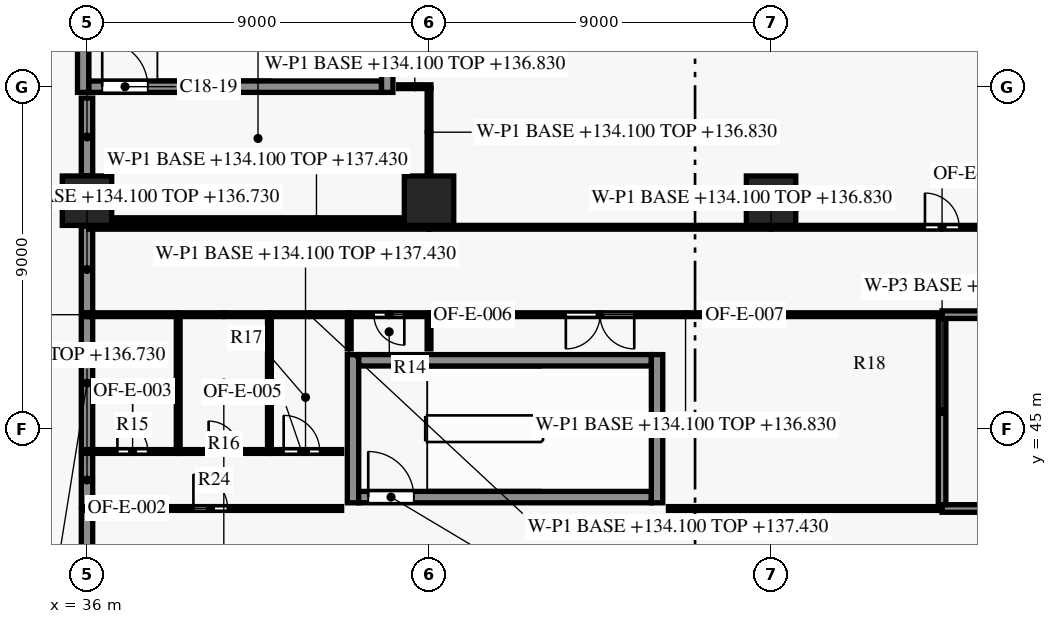
"""IFC4 building model, lengths in metres.
Left out: names, types, materials, properties, quantities, classifications, styles, units other than length and angle.
Written with IfcOpenShell. Run it as: python <this file> out.ifc"""

import sys

from ifc_helpers import new_model, si_unit, direction, frame, frame_2d, origin, origin_2d, place, context, subcontext, project, spatial, rectangle, extrude, element, fill, save


model = new_model("IFC4")
c1 = context("Model", 3, precision=1e-05, world=origin(), true_north=direction((0.0, 1.0)))
c2 = subcontext(c1, "Body", "Model", "MODEL_VIEW")
j1 = project(units=[si_unit("LENGTHUNIT", "METRE"), si_unit("PLANEANGLEUNIT", "RADIAN")], contexts=[c1])
p1 = place(None, origin())
s1 = spatial("IfcSite", under=j1, at=p1, CompositionType="ELEMENT")
p2 = place(p1, origin())
s2 = spatial("IfcBuilding", under=s1, at=p2, CompositionType="ELEMENT")
p3 = place(p2, frame((0.0, 0.0, 134.1)))
s3 = spatial("IfcBuildingStorey", under=s2, at=p3, CompositionType="ELEMENT", Elevation=134.1)
for number, where, z_axis, x_axis in (
    (1, (36.0, 51.0, 0.0), (0.0, 0.0, 1.0), (1.0, 0.0, 0.0)),
    (2, (45.0, 51.0, 0.0), (0.0, 0.0, 1.0), (1.0, 0.0, 0.0)),
    (3, (54.0, 51.0, 0.0), (0.0, 0.0, 1.0), (1.0, 0.0, 0.0)),
):
    element("IfcColumn", number, at=place(p3, frame(where, z_axis=z_axis, x_axis=x_axis)), inside=s3, PredefinedType="COLUMN", context=c2, shape_type="SweptSolid", body=[
        extrude(rectangle(XDim=1.3, YDim=1.3, at=origin_2d()), origin(), (0.0, 0.0, 1.0), 3.8),
    ])
p4 = place(p3, frame((43.15, 43.2, 0.0), z_axis=(0.0, 0.0, 1.0), x_axis=(1.0, 0.0, 0.0)))
e4 = element("IfcWall", 4, at=p4, inside=s3, PredefinedType="SHEAR", context=c2, shape_type="SweptSolid", body=[
    extrude(rectangle(XDim=7.7, YDim=0.3, at=frame_2d((3.85, 0.0))), origin(), (0.0, 0.0, 1.0), 3.5),
])
p5 = place(p4, frame((0.25, 0.0, 0.0)))
e5 = element("IfcOpeningElement", 5, at=p5, cuts=e4, PredefinedType="OPENING", context=c2, shape_type="SweptSolid", body=[
    extrude(rectangle(XDim=1.2, YDim=2.2, at=frame_2d((0.6, 1.1))), frame((0.0, 0.16, 0.0), z_axis=(0.0, -1.0, 0.0), x_axis=(1.0, 0.0, 0.0)), (0.0, 0.0, 1.0), 0.32),
])
p6 = place(p3, frame((43.15, 46.8, 0.0), z_axis=(0.0, 0.0, 1.0), x_axis=(1.0, 0.0, 0.0)))
e6 = element("IfcWall", 6, at=p6, inside=s3, PredefinedType="SHEAR", context=c2, shape_type="SweptSolid", body=[
    extrude(rectangle(XDim=7.7, YDim=0.3, at=frame_2d((3.85, 0.0))), origin(), (0.0, 0.0, 1.0), 3.5),
])
p7 = place(p3, frame((36.05, 54.0, 0.0), z_axis=(0.0, 0.0, 1.0), x_axis=(1.0, 0.0, 0.0)))
e7 = element("IfcWall", 7, at=p7, inside=s3, PredefinedType="SHEAR", context=c2, shape_type="SweptSolid", body=[
    extrude(rectangle(XDim=7.7, YDim=0.3, at=frame_2d((3.85, 0.0))), origin(), (0.0, 0.0, 1.0), 3.5),
])
p8 = place(p7, frame((0.35, 0.0, 0.0)))
e8 = element("IfcOpeningElement", 8, at=p8, cuts=e7, PredefinedType="OPENING", context=c2, shape_type="SweptSolid", body=[
    extrude(rectangle(XDim=1.2, YDim=2.2, at=frame_2d((0.6, 1.1))), frame((0.0, 0.16, 0.0), z_axis=(0.0, -1.0, 0.0), x_axis=(1.0, 0.0, 0.0)), (0.0, 0.0, 1.0), 0.32),
])
for number, where, z_axis, x_axis in (
    (9, (35.9, 53.85, 0.0), (0.0, 0.0, 1.0), (0.0, 1.0, 0.0)),
    (10, (43.0, 43.05, 0.0), (0.0, 0.0, 1.0), (0.0, 1.0, 0.0)),
    (11, (43.9, 53.85, 0.0), (0.0, 0.0, 1.0), (0.0, 1.0, 0.0)),
    (12, (51.0, 43.05, 0.0), (0.0, 0.0, 1.0), (0.0, 1.0, 0.0)),
):
    element("IfcWall", number, at=place(p3, frame(where, z_axis=z_axis, x_axis=x_axis)), inside=s3, PredefinedType="SHEAR", context=c2, shape_type="SweptSolid", body=[
        extrude(rectangle(XDim=3.9, YDim=0.3, at=frame_2d((1.95, 0.0))), origin(), (0.0, 0.0, 1.0), 3.5),
    ])
p9 = place(p3, frame((36.0, 39.67, 0.0), z_axis=(0.0, 0.0, 1.0), x_axis=(0.0, 1.0, 0.0)))
e13 = element("IfcWall", 13, at=p9, inside=s3, PredefinedType="PARTITIONING", context=c2, shape_type="SweptSolid", body=[
    extrude(rectangle(XDim=3.18, YDim=0.3, at=frame_2d((1.59, 0.0))), origin(), (0.0, 0.0, 1.0), 2.63),
])
p10 = place(p3, frame((36.05, 42.9, 0.0), z_axis=(0.0, 0.0, 1.0), x_axis=(1.0, 0.0, 0.0)))
e14 = element("IfcWall", 14, at=p10, inside=s3, PredefinedType="PARTITIONING", context=c2, shape_type="SweptSolid", body=[
    extrude(rectangle(XDim=6.65, YDim=0.1, at=frame_2d((3.325, 0.0))), origin(), (0.0, 0.0, 1.0), 2.63),
])
p11 = place(p10, frame((2.75, 0.0, 0.0)))
e15 = element("IfcOpeningElement", 15, at=p11, cuts=e14, PredefinedType="OPENING", context=c2, shape_type="SweptSolid", body=[
    extrude(rectangle(XDim=0.9, YDim=2.1, at=frame_2d((0.45, 1.05))), frame((0.0, 0.06, 0.0), z_axis=(0.0, -1.0, 0.0), x_axis=(1.0, 0.0, 0.0)), (0.0, 0.0, 1.0), 0.12),
])
p12 = place(p3, frame((51.3, 42.9, 0.0), z_axis=(0.0, 0.0, 1.0), x_axis=(1.0, 0.0, 0.0)))
e16 = element("IfcWall", 16, at=p12, inside=s3, PredefinedType="PARTITIONING", context=c2, shape_type="SweptSolid", body=[
    extrude(rectangle(XDim=7.2, YDim=0.1, at=frame_2d((3.6, 0.0))), origin(), (0.0, 0.0, 1.0), 2.63),
])
p13 = place(p3, frame((58.5, 42.9, 0.0), z_axis=(0.0, 0.0, 1.0), x_axis=(1.0, 0.0, 0.0)))
e17 = element("IfcWall", 17, at=p13, inside=s3, PredefinedType="PARTITIONING", context=c2, shape_type="SweptSolid", body=[
    extrude(rectangle(XDim=10.3, YDim=0.2, at=frame_2d((5.15, 0.0))), origin(), (0.0, 0.0, 1.0), 2.73),
])
p14 = place(p13, frame((4.6, 0.0, 0.0)))
e18 = element("IfcOpeningElement", 18, at=p14, cuts=e17, PredefinedType="OPENING", context=c2, shape_type="SweptSolid", body=[
    extrude(rectangle(XDim=1.0, YDim=2.1, at=frame_2d((0.5, 1.05))), frame((0.0, 0.11, 0.0), z_axis=(0.0, -1.0, 0.0), x_axis=(1.0, 0.0, 0.0)), (0.0, 0.0, 1.0), 0.22),
])
p15 = place(p3, frame((36.0, 42.95, 0.0), z_axis=(0.0, 0.0, 1.0), x_axis=(0.0, 1.0, 0.0)))
e19 = element("IfcWall", 19, at=p15, inside=s3, PredefinedType="PARTITIONING", context=c2, shape_type="SweptSolid", body=[
    extrude(rectangle(XDim=1.4, YDim=0.3, at=frame_2d((0.7, 0.0))), origin(), (0.0, 0.0, 1.0), 2.63),
])
p16 = place(p3, frame((36.05, 44.4, 0.0), z_axis=(0.0, 0.0, 1.0), x_axis=(1.0, 0.0, 0.0)))
e20 = element("IfcWall", 20, at=p16, inside=s3, PredefinedType="PARTITIONING", context=c2, shape_type="SweptSolid", body=[
    extrude(rectangle(XDim=2.35, YDim=0.1, at=frame_2d((1.175, 0.0))), origin(), (0.0, 0.0, 1.0), 2.63),
])
p17 = place(p16, frame((0.75, 0.0, 0.0)))
e21 = element("IfcOpeningElement", 21, at=p17, cuts=e20, PredefinedType="OPENING", context=c2, shape_type="SweptSolid", body=[
    extrude(rectangle(XDim=0.8, YDim=2.1, at=frame_2d((0.4, 1.05))), frame((0.0, 0.06, 0.0), z_axis=(0.0, -1.0, 0.0), x_axis=(1.0, 0.0, 0.0)), (0.0, 0.0, 1.0), 0.12),
])
p18 = place(p3, frame((38.4, 44.4, 0.0), z_axis=(0.0, 0.0, 1.0), x_axis=(1.0, 0.0, 0.0)))
e22 = element("IfcWall", 22, at=p18, inside=s3, PredefinedType="PARTITIONING", context=c2, shape_type="SweptSolid", body=[
    extrude(rectangle(XDim=2.4, YDim=0.1, at=frame_2d((1.2, 0.0))), origin(), (0.0, 0.0, 1.0), 3.33),
])
p19 = place(p18, frame((0.8, 0.0, 0.0)))
e23 = element("IfcOpeningElement", 23, at=p19, cuts=e22, PredefinedType="OPENING", context=c2, shape_type="SweptSolid", body=[
    extrude(rectangle(XDim=0.8, YDim=2.1, at=frame_2d((0.4, 1.05))), frame((0.0, 0.06, 0.0), z_axis=(0.0, -1.0, 0.0), x_axis=(1.0, 0.0, 0.0)), (0.0, 0.0, 1.0), 0.12),
])
p20 = place(p3, frame((40.8, 44.4, 0.0), z_axis=(0.0, 0.0, 1.0), x_axis=(1.0, 0.0, 0.0)))
e24 = element("IfcWall", 24, at=p20, inside=s3, PredefinedType="PARTITIONING", context=c2, shape_type="SweptSolid", body=[
    extrude(rectangle(XDim=1.9, YDim=0.1, at=frame_2d((0.95, 0.0))), origin(), (0.0, 0.0, 1.0), 3.33),
])
p21 = place(p20, frame((0.375, 0.0, 0.0)))
e25 = element("IfcOpeningElement", 25, at=p21, cuts=e24, PredefinedType="OPENING", context=c2, shape_type="SweptSolid", body=[
    extrude(rectangle(XDim=0.95, YDim=2.1, at=frame_2d((0.475, 1.05))), frame((0.0, 0.06, 0.0), z_axis=(0.0, -1.0, 0.0), x_axis=(1.0, 0.0, 0.0)), (0.0, 0.0, 1.0), 0.12),
])
p22 = place(p3, frame((36.0, 44.45, 0.0), z_axis=(0.0, 0.0, 1.0), x_axis=(0.0, 1.0, 0.0)))
e26 = element("IfcWall", 26, at=p22, inside=s3, PredefinedType="PARTITIONING", context=c2, shape_type="SweptSolid", body=[
    extrude(rectangle(XDim=3.5, YDim=0.3, at=frame_2d((1.75, 0.0))), origin(), (0.0, 0.0, 1.0), 2.63),
])
p23 = place(p3, frame((58.5, 47.9, 0.0), z_axis=(0.0, 0.0, 1.0), x_axis=(0.0, -1.0, 0.0)))
e27 = element("IfcWall", 27, at=p23, inside=s3, PredefinedType="PARTITIONING", context=c2, shape_type="SweptSolid", body=[
    extrude(rectangle(XDim=4.9, YDim=0.2, at=frame_2d((2.45, 0.0))), origin(), (0.0, 0.0, 1.0), 3.33),
])
for number, where, z_axis, x_axis in (
    (28, (38.4, 47.95, 0.0), (0.0, 0.0, 1.0), (0.0, -1.0, 0.0)),
    (29, (40.8, 47.95, 0.0), (0.0, 0.0, 1.0), (0.0, -1.0, 0.0)),
):
    element("IfcWall", number, at=place(p3, frame(where, z_axis=z_axis, x_axis=x_axis)), inside=s3, PredefinedType="PARTITIONING", context=c2, shape_type="SweptSolid", body=[
        extrude(rectangle(XDim=3.5, YDim=0.1, at=frame_2d((1.75, 0.0))), origin(), (0.0, 0.0, 1.0), 2.63),
    ])
for number, where, z_axis, x_axis in (
    (30, (42.9, 47.95, 0.0), (0.0, 0.0, 1.0), (0.0, -1.0, 0.0)),
    (31, (45.0, 47.95, 0.0), (0.0, 0.0, 1.0), (0.0, -1.0, 0.0)),
):
    element("IfcWall", number, at=place(p3, frame(where, z_axis=z_axis, x_axis=x_axis)), inside=s3, PredefinedType="PARTITIONING", context=c2, shape_type="SweptSolid", body=[
        extrude(rectangle(XDim=0.85, YDim=0.1, at=frame_2d((0.425, 0.0))), origin(), (0.0, 0.0, 1.0), 2.63),
    ])
p24 = place(p3, frame((38.4, 48.0, 0.0), z_axis=(0.0, 0.0, 1.0), x_axis=(-1.0, 0.0, 0.0)))
e32 = element("IfcWall", 32, at=p24, inside=s3, PredefinedType="PARTITIONING", context=c2, shape_type="SweptSolid", body=[
    extrude(rectangle(XDim=2.35, YDim=0.1, at=frame_2d((1.175, 0.0))), origin(), (0.0, 0.0, 1.0), 2.63),
])
p25 = place(p3, frame((40.8, 48.0, 0.0), z_axis=(0.0, 0.0, 1.0), x_axis=(-1.0, 0.0, 0.0)))
e33 = element("IfcWall", 33, at=p25, inside=s3, PredefinedType="PARTITIONING", context=c2, shape_type="SweptSolid", body=[
    extrude(rectangle(XDim=2.4, YDim=0.1, at=frame_2d((1.2, 0.0))), origin(), (0.0, 0.0, 1.0), 3.33),
])
p26 = place(p3, frame((42.9, 48.0, 0.0), z_axis=(0.0, 0.0, 1.0), x_axis=(-1.0, 0.0, 0.0)))
e34 = element("IfcWall", 34, at=p26, inside=s3, PredefinedType="PARTITIONING", context=c2, shape_type="SweptSolid", body=[
    extrude(rectangle(XDim=2.1, YDim=0.1, at=frame_2d((1.05, 0.0))), origin(), (0.0, 0.0, 1.0), 3.33),
])
p27 = place(p3, frame((45.0, 48.0, 0.0), z_axis=(0.0, 0.0, 1.0), x_axis=(-1.0, 0.0, 0.0)))
e35 = element("IfcWall", 35, at=p27, inside=s3, PredefinedType="PARTITIONING", context=c2, shape_type="SweptSolid", body=[
    extrude(rectangle(XDim=2.1, YDim=0.1, at=frame_2d((1.05, 0.0))), origin(), (0.0, 0.0, 1.0), 2.73),
])
p28 = place(p27, frame((0.65, 0.0, 0.0)))
e36 = element("IfcOpeningElement", 36, at=p28, cuts=e35, PredefinedType="OPENING", context=c2, shape_type="SweptSolid", body=[
    extrude(rectangle(XDim=0.8, YDim=2.1, at=frame_2d((0.4, 1.05))), frame((0.0, 0.06, 0.0), z_axis=(0.0, -1.0, 0.0), x_axis=(1.0, 0.0, 0.0)), (0.0, 0.0, 1.0), 0.12),
])
p29 = place(p3, frame((58.5, 48.0, 0.0), z_axis=(0.0, 0.0, 1.0), x_axis=(-1.0, 0.0, 0.0)))
e37 = element("IfcWall", 37, at=p29, inside=s3, PredefinedType="PARTITIONING", context=c2, shape_type="SweptSolid", body=[
    extrude(rectangle(XDim=13.5, YDim=0.1, at=frame_2d((6.75, 0.0))), origin(), (0.0, 0.0, 1.0), 2.73),
])
p30 = place(p29, frame((8.1, 0.0, 0.0)))
e38 = element("IfcOpeningElement", 38, at=p30, cuts=e37, PredefinedType="OPENING", context=c2, shape_type="SweptSolid", body=[
    extrude(rectangle(XDim=1.8, YDim=2.1, at=frame_2d((0.9, 1.05))), frame((0.0, 0.06, 0.0), z_axis=(0.0, -1.0, 0.0), x_axis=(1.0, 0.0, 0.0)), (0.0, 0.0, 1.0), 0.12),
])
p31 = place(p3, frame((68.8, 48.0, 0.0), z_axis=(0.0, 0.0, 1.0), x_axis=(-1.0, 0.0, 0.0)))
e39 = element("IfcWall", 39, at=p31, inside=s3, PredefinedType="PARTITIONING", context=c2, shape_type="SweptSolid", body=[
    extrude(rectangle(XDim=10.3, YDim=0.2, at=frame_2d((5.15, 0.0))), origin(), (0.0, 0.0, 1.0), 2.73),
])
p32 = place(p3, frame((36.0, 48.05, 0.0), z_axis=(0.0, 0.0, 1.0), x_axis=(0.0, 1.0, 0.0)))
e40 = element("IfcWall", 40, at=p32, inside=s3, PredefinedType="PARTITIONING", context=c2, shape_type="SweptSolid", body=[
    extrude(rectangle(XDim=2.28, YDim=0.3, at=frame_2d((1.14, 0.0))), origin(), (0.0, 0.0, 1.0), 2.63),
])
p33 = place(p3, frame((36.05, 50.3, 0.0), z_axis=(0.0, 0.0, 1.0), x_axis=(1.0, 0.0, 0.0)))
e41 = element("IfcWall", 41, at=p33, inside=s3, PredefinedType="PARTITIONING", context=c2, shape_type="SweptSolid", body=[
    extrude(rectangle(XDim=8.95, YDim=0.1, at=frame_2d((4.475, 0.0))), origin(), (0.0, 0.0, 1.0), 2.63),
])
p34 = place(p3, frame((45.0, 50.3, 0.0), z_axis=(0.0, 0.0, 1.0), x_axis=(1.0, 0.0, 0.0)))
e42 = element("IfcWall", 42, at=p34, inside=s3, PredefinedType="PARTITIONING", context=c2, shape_type="SweptSolid", body=[
    extrude(rectangle(XDim=18.0, YDim=0.1, at=frame_2d((9.0, 0.0))), origin(), (0.0, 0.0, 1.0), 2.73),
])
p35 = place(p34, frame((13.05, 0.0, 0.0)))
e43 = element("IfcOpeningElement", 43, at=p35, cuts=e42, PredefinedType="OPENING", context=c2, shape_type="SweptSolid", body=[
    extrude(rectangle(XDim=0.9, YDim=2.1, at=frame_2d((0.45, 1.05))), frame((0.0, 0.06, 0.0), z_axis=(0.0, -1.0, 0.0), x_axis=(1.0, 0.0, 0.0)), (0.0, 0.0, 1.0), 0.12),
])
p36 = place(p3, frame((44.345, 50.5, 0.0), z_axis=(0.0, 0.0, 1.0), x_axis=(-1.0, 0.0, 0.0)))
e44 = element("IfcWall", 44, at=p36, inside=s3, PredefinedType="PARTITIONING", context=c2, shape_type="SweptSolid", body=[
    extrude(rectangle(XDim=7.69, YDim=0.1, at=frame_2d((3.845, 0.0))), origin(), (0.0, 0.0, 1.0), 3.33),
])
p37 = place(p3, frame((36.0, 51.655, 0.0), z_axis=(0.0, 0.0, 1.0), x_axis=(0.0, 1.0, 0.0)))
e45 = element("IfcWall", 45, at=p37, inside=s3, PredefinedType="PARTITIONING", context=c2, shape_type="SweptSolid", body=[
    extrude(rectangle(XDim=2.045, YDim=0.3, at=frame_2d((1.022, 0.0))), origin(), (0.0, 0.0, 1.0), 2.63),
])
p38 = place(p3, frame((45.0, 53.95, 0.0), z_axis=(0.0, 0.0, 1.0), x_axis=(0.0, -1.0, 0.0)))
e46 = element("IfcWall", 46, at=p38, inside=s3, PredefinedType="PARTITIONING", context=c2, shape_type="SweptSolid", body=[
    extrude(rectangle(XDim=2.295, YDim=0.1, at=frame_2d((1.147, 0.0))), origin(), (0.0, 0.0, 1.0), 2.73),
])
p39 = place(p3, frame((44.2, 54.0, 0.0), z_axis=(0.0, 0.0, 1.0), x_axis=(1.0, 0.0, 0.0)))
e47 = element("IfcWall", 47, at=p39, inside=s3, PredefinedType="PARTITIONING", context=c2, shape_type="SweptSolid", body=[
    extrude(rectangle(XDim=0.85, YDim=0.1, at=frame_2d((0.425, 0.0))), origin(), (0.0, 0.0, 1.0), 2.73),
])
p40 = place(p8, origin())
e48 = element("IfcDoor", 48, at=p40, inside=s3, OperationType="SINGLE_SWING_LEFT", PredefinedType="DOOR", context=c2, shape_type="SweptSolid", body=[
    extrude(rectangle(XDim=1.2, YDim=2.2, at=frame_2d((0.6, 1.1))), frame((0.0, 0.025, 0.0), z_axis=(0.0, -1.0, 0.0), x_axis=(1.0, 0.0, 0.0)), (0.0, 0.0, 1.0), 0.05),
])
fill(e8, e48)
p41 = place(p5, origin())
e49 = element("IfcDoor", 49, at=p41, inside=s3, OperationType="SINGLE_SWING_RIGHT", PredefinedType="DOOR", context=c2, shape_type="SweptSolid", body=[
    extrude(rectangle(XDim=1.2, YDim=2.2, at=frame_2d((0.6, 1.1))), frame((0.0, 0.025, 0.0), z_axis=(0.0, -1.0, 0.0), x_axis=(1.0, 0.0, 0.0)), (0.0, 0.0, 1.0), 0.05),
])
fill(e5, e49)
p42 = place(p11, origin())
e50 = element("IfcDoor", 50, at=p42, inside=s3, OperationType="SINGLE_SWING_LEFT", PredefinedType="DOOR", context=c2, shape_type="SweptSolid", body=[
    extrude(rectangle(XDim=0.9, YDim=2.1, at=frame_2d((0.45, 1.05))), frame((0.0, 0.025, 0.0), z_axis=(0.0, -1.0, 0.0), x_axis=(1.0, 0.0, 0.0)), (0.0, 0.0, 1.0), 0.05),
])
fill(e15, e50)
p43 = place(p17, origin())
e51 = element("IfcDoor", 51, at=p43, inside=s3, OperationType="SINGLE_SWING_LEFT", PredefinedType="DOOR", context=c2, shape_type="SweptSolid", body=[
    extrude(rectangle(XDim=0.8, YDim=2.1, at=frame_2d((0.4, 1.05))), frame((0.0, 0.025, 0.0), z_axis=(0.0, -1.0, 0.0), x_axis=(1.0, 0.0, 0.0)), (0.0, 0.0, 1.0), 0.05),
])
fill(e21, e51)
p44 = place(p19, origin())
e52 = element("IfcDoor", 52, at=p44, inside=s3, OperationType="SINGLE_SWING_RIGHT", PredefinedType="DOOR", context=c2, shape_type="SweptSolid", body=[
    extrude(rectangle(XDim=0.8, YDim=2.1, at=frame_2d((0.4, 1.05))), frame((0.0, 0.025, 0.0), z_axis=(0.0, -1.0, 0.0), x_axis=(1.0, 0.0, 0.0)), (0.0, 0.0, 1.0), 0.05),
])
fill(e23, e52)
p45 = place(p21, origin())
e53 = element("IfcDoor", 53, at=p45, inside=s3, OperationType="SINGLE_SWING_LEFT", PredefinedType="DOOR", context=c2, shape_type="SweptSolid", body=[
    extrude(rectangle(XDim=0.95, YDim=2.1, at=frame_2d((0.475, 1.05))), frame((0.0, 0.025, 0.0), z_axis=(0.0, -1.0, 0.0), x_axis=(1.0, 0.0, 0.0)), (0.0, 0.0, 1.0), 0.05),
])
fill(e25, e53)
p46 = place(p28, origin())
e54 = element("IfcDoor", 54, at=p46, inside=s3, OperationType="SINGLE_SWING_LEFT", PredefinedType="DOOR", context=c2, shape_type="SweptSolid", body=[
    extrude(rectangle(XDim=0.8, YDim=2.1, at=frame_2d((0.4, 1.05))), frame((0.0, 0.025, 0.0), z_axis=(0.0, -1.0, 0.0), x_axis=(1.0, 0.0, 0.0)), (0.0, 0.0, 1.0), 0.05),
])
fill(e36, e54)
p47 = place(p30, origin())
e55 = element("IfcDoor", 55, at=p47, inside=s3, OperationType="DOUBLE_DOOR_SINGLE_SWING", PredefinedType="DOOR", context=c2, shape_type="SweptSolid", body=[
    extrude(rectangle(XDim=1.8, YDim=2.1, at=frame_2d((0.9, 1.05))), frame((0.0, 0.025, 0.0), z_axis=(0.0, -1.0, 0.0), x_axis=(1.0, 0.0, 0.0)), (0.0, 0.0, 1.0), 0.05),
])
fill(e38, e55)
p48 = place(p35, origin())
e56 = element("IfcDoor", 56, at=p48, inside=s3, OperationType="SINGLE_SWING_LEFT", PredefinedType="DOOR", context=c2, shape_type="SweptSolid", body=[
    extrude(rectangle(XDim=0.9, YDim=2.1, at=frame_2d((0.45, 1.05))), frame((0.0, 0.025, 0.0), z_axis=(0.0, -1.0, 0.0), x_axis=(1.0, 0.0, 0.0)), (0.0, 0.0, 1.0), 0.05),
])
fill(e43, e56)
save(model, sys.argv[1])
